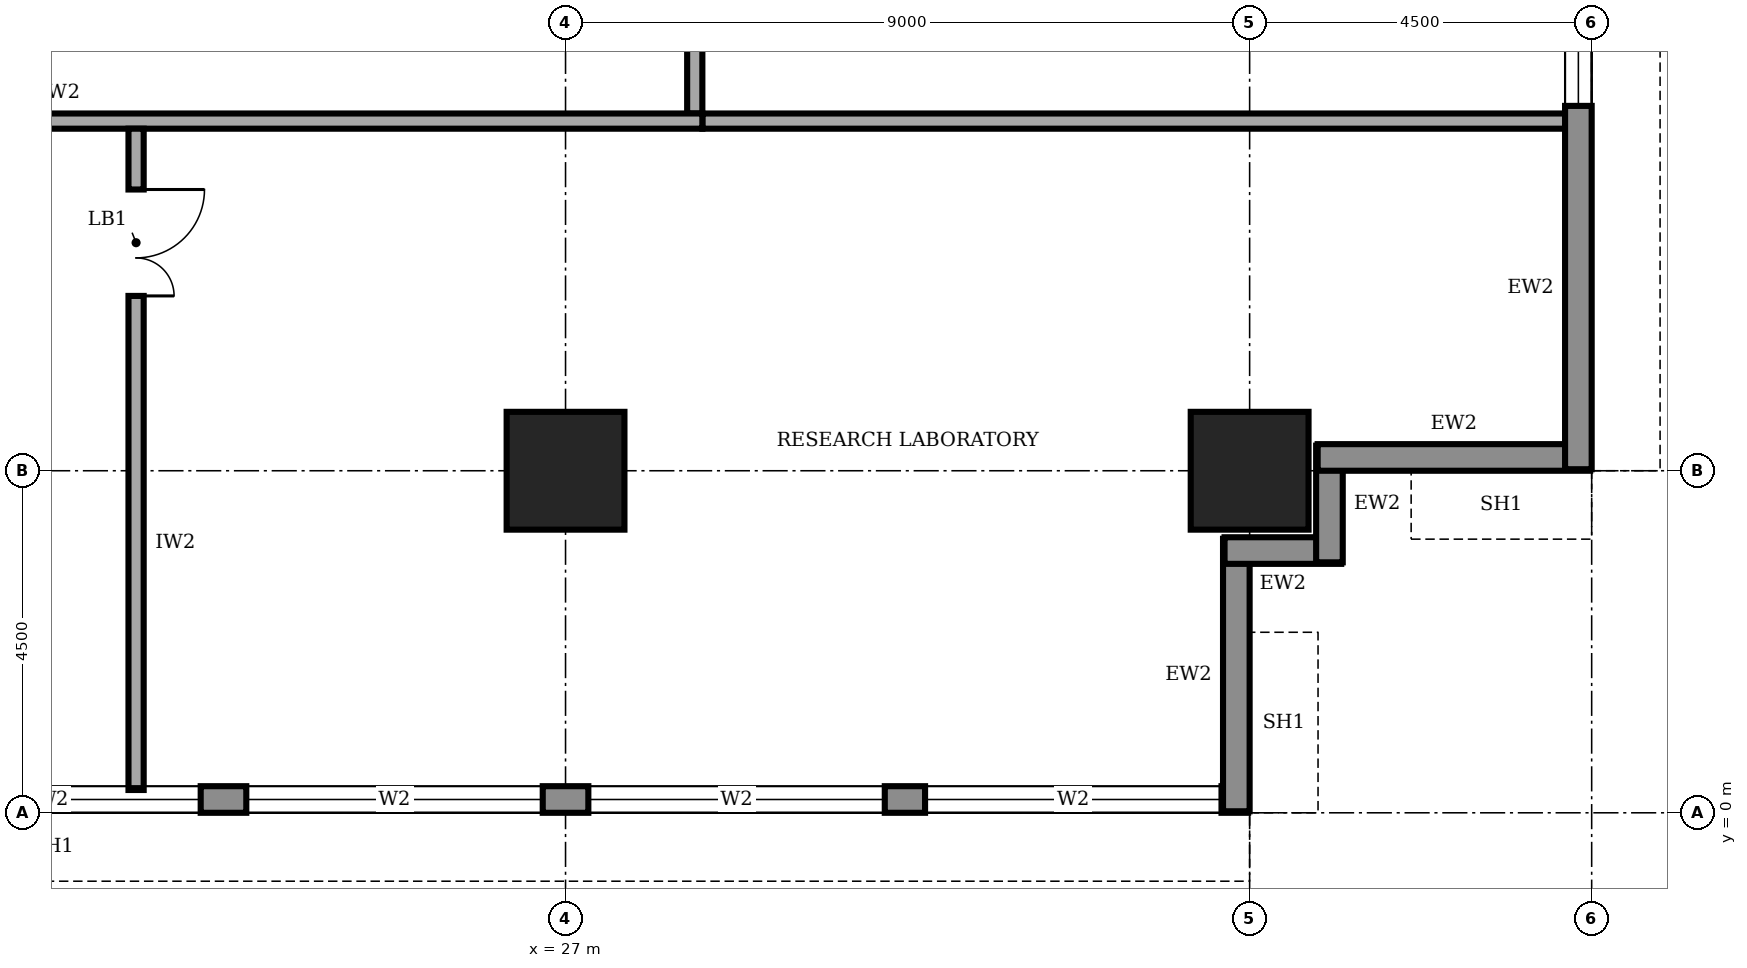
"""IFC4 building model, lengths in metres.
Left out: names, types, materials, properties, quantities, classifications, styles, units other than length and angle.
Written with IfcOpenShell. Run it as: python <this file> out.ifc"""

import sys

from ifc_helpers import new_model, si_unit, direction, frame, frame_2d, origin, origin_2d, place, context, subcontext, project, spatial, rectangle, extrude, element, fill, save


model = new_model("IFC4")
c1 = context("Model", 3, precision=1e-05, world=origin(), true_north=direction((0.0, 1.0)))
c2 = subcontext(c1, "Body", "Model", "MODEL_VIEW")
j1 = project(units=[si_unit("LENGTHUNIT", "METRE"), si_unit("PLANEANGLEUNIT", "RADIAN")], contexts=[c1])
p1 = place(None, origin())
s1 = spatial("IfcSite", under=j1, at=p1, CompositionType="ELEMENT")
p2 = place(p1, origin())
s2 = spatial("IfcBuilding", under=s1, at=p2, CompositionType="ELEMENT")
p3 = place(p2, frame((0.0, 0.0, 233.0)))
s3 = spatial("IfcBuildingStorey", under=s2, at=p3, CompositionType="ELEMENT", Elevation=233.0)
for number, where, z_axis, x_axis in (
    (1, (27.0, 4.5, 0.0), (0.0, 0.0, 1.0), (1.0, 0.0, 0.0)),
    (2, (36.0, 4.5, 0.0), (0.0, 0.0, 1.0), (1.0, 0.0, 0.0)),
):
    element("IfcColumn", number, at=place(p3, frame(where, z_axis=z_axis, x_axis=x_axis)), inside=s3, PredefinedType="COLUMN", context=c2, shape_type="SweptSolid", body=[
        extrude(rectangle(XDim=1.55, YDim=1.55, at=origin_2d()), origin(), (0.0, 0.0, 1.0), 4.0),
    ])
p4 = place(p3, frame((4.52, 0.175, 0.0), z_axis=(0.0, 0.0, 1.0), x_axis=(1.0, 0.0, 0.0)))
e3 = element("IfcWall", 3, at=p4, inside=s3, PredefinedType="STANDARD", context=c2, shape_type="SweptSolid", body=[
    extrude(rectangle(XDim=31.46, YDim=0.35, at=frame_2d((15.73, 0.0))), origin(), (0.0, 0.0, 1.0), 3.75),
])
p5 = place(p4, frame((4.78, 0.0, 0.6)))
e4 = element("IfcOpeningElement", 4, at=p5, cuts=e3, PredefinedType="OPENING", context=c2, shape_type="SweptSolid", body=[
    extrude(rectangle(XDim=3.9, YDim=2.6, at=frame_2d((1.95, 1.3))), frame((0.0, 0.185, 0.0), z_axis=(0.0, -1.0, 0.0), x_axis=(1.0, 0.0, 0.0)), (0.0, 0.0, 1.0), 0.37),
])
p6 = place(p4, frame((9.28, 0.0, 0.6)))
e5 = element("IfcOpeningElement", 5, at=p6, cuts=e3, PredefinedType="OPENING", context=c2, shape_type="SweptSolid", body=[
    extrude(rectangle(XDim=3.9, YDim=2.6, at=frame_2d((1.95, 1.3))), frame((0.0, 0.185, 0.0), z_axis=(0.0, -1.0, 0.0), x_axis=(1.0, 0.0, 0.0)), (0.0, 0.0, 1.0), 0.37),
])
p7 = place(p4, frame((13.78, 0.0, 0.6)))
e6 = element("IfcOpeningElement", 6, at=p7, cuts=e3, PredefinedType="OPENING", context=c2, shape_type="SweptSolid", body=[
    extrude(rectangle(XDim=3.9, YDim=2.6, at=frame_2d((1.95, 1.3))), frame((0.0, 0.185, 0.0), z_axis=(0.0, -1.0, 0.0), x_axis=(1.0, 0.0, 0.0)), (0.0, 0.0, 1.0), 0.37),
])
p8 = place(p4, frame((18.28, 0.0, 0.6)))
e7 = element("IfcOpeningElement", 7, at=p8, cuts=e3, PredefinedType="OPENING", context=c2, shape_type="SweptSolid", body=[
    extrude(rectangle(XDim=3.9, YDim=2.6, at=frame_2d((1.95, 1.3))), frame((0.0, 0.185, 0.0), z_axis=(0.0, -1.0, 0.0), x_axis=(1.0, 0.0, 0.0)), (0.0, 0.0, 1.0), 0.37),
])
p9 = place(p4, frame((22.78, 0.0, 0.6)))
e8 = element("IfcOpeningElement", 8, at=p9, cuts=e3, PredefinedType="OPENING", context=c2, shape_type="SweptSolid", body=[
    extrude(rectangle(XDim=3.9, YDim=2.6, at=frame_2d((1.95, 1.3))), frame((0.0, 0.185, 0.0), z_axis=(0.0, -1.0, 0.0), x_axis=(1.0, 0.0, 0.0)), (0.0, 0.0, 1.0), 0.37),
])
p10 = place(p4, frame((27.21, 0.0, 0.6)))
e9 = element("IfcOpeningElement", 9, at=p10, cuts=e3, PredefinedType="OPENING", context=c2, shape_type="SweptSolid", body=[
    extrude(rectangle(XDim=3.9, YDim=2.6, at=frame_2d((1.95, 1.3))), frame((0.0, 0.185, 0.0), z_axis=(0.0, -1.0, 0.0), x_axis=(1.0, 0.0, 0.0)), (0.0, 0.0, 1.0), 0.37),
])
p11 = place(p3, frame((35.825, 0.02, 0.0), z_axis=(0.0, 0.0, 1.0), x_axis=(0.0, 1.0, 0.0)))
e10 = element("IfcWall", 10, at=p11, inside=s3, PredefinedType="STANDARD", context=c2, shape_type="SweptSolid", body=[
    extrude(rectangle(XDim=3.585, YDim=0.35, at=frame_2d((1.792, 0.0))), origin(), (0.0, 0.0, 1.0), 2.85),
])
for number, where, z_axis, x_axis in (
    (11, (35.67, 3.45, 0.0), (0.0, 0.0, 1.0), (1.0, 0.0, 0.0)),
    (12, (37.05, 3.295, 0.0), (0.0, 0.0, 1.0), (0.0, 1.0, 0.0)),
):
    element("IfcWall", number, at=place(p3, frame(where, z_axis=z_axis, x_axis=x_axis)), inside=s3, PredefinedType="STANDARD", context=c2, shape_type="SweptSolid", body=[
        extrude(rectangle(XDim=1.535, YDim=0.35, at=frame_2d((0.768, 0.0))), origin(), (0.0, 0.0, 1.0), 3.75),
    ])
p12 = place(p3, frame((36.895, 4.675, 0.0), z_axis=(0.0, 0.0, 1.0), x_axis=(1.0, 0.0, 0.0)))
e13 = element("IfcWall", 13, at=p12, inside=s3, PredefinedType="STANDARD", context=c2, shape_type="SweptSolid", body=[
    extrude(rectangle(XDim=3.585, YDim=0.35, at=frame_2d((1.792, 0.0))), origin(), (0.0, 0.0, 1.0), 2.85),
])
p13 = place(p3, frame((40.325, 4.52, 0.0), z_axis=(0.0, 0.0, 1.0), x_axis=(0.0, 1.0, 0.0)))
e14 = element("IfcWall", 14, at=p13, inside=s3, PredefinedType="STANDARD", context=c2, shape_type="SweptSolid", body=[
    extrude(rectangle(XDim=31.46, YDim=0.35, at=frame_2d((15.73, 0.0))), origin(), (0.0, 0.0, 1.0), 3.75),
])
p14 = place(p13, frame((4.78, 0.0, 0.6)))
e15 = element("IfcOpeningElement", 15, at=p14, cuts=e14, PredefinedType="OPENING", context=c2, shape_type="SweptSolid", body=[
    extrude(rectangle(XDim=3.9, YDim=2.6, at=frame_2d((1.95, 1.3))), frame((0.0, 0.185, 0.0), z_axis=(0.0, -1.0, 0.0), x_axis=(1.0, 0.0, 0.0)), (0.0, 0.0, 1.0), 0.37),
])
p15 = place(p13, frame((9.28, 0.0, 0.6)))
e16 = element("IfcOpeningElement", 16, at=p15, cuts=e14, PredefinedType="OPENING", context=c2, shape_type="SweptSolid", body=[
    extrude(rectangle(XDim=3.9, YDim=2.6, at=frame_2d((1.95, 1.3))), frame((0.0, 0.185, 0.0), z_axis=(0.0, -1.0, 0.0), x_axis=(1.0, 0.0, 0.0)), (0.0, 0.0, 1.0), 0.37),
])
p16 = place(p13, frame((13.78, 0.0, 0.6)))
e17 = element("IfcOpeningElement", 17, at=p16, cuts=e14, PredefinedType="OPENING", context=c2, shape_type="SweptSolid", body=[
    extrude(rectangle(XDim=3.9, YDim=2.6, at=frame_2d((1.95, 1.3))), frame((0.0, 0.185, 0.0), z_axis=(0.0, -1.0, 0.0), x_axis=(1.0, 0.0, 0.0)), (0.0, 0.0, 1.0), 0.37),
])
p17 = place(p13, frame((18.28, 0.0, 0.6)))
e18 = element("IfcOpeningElement", 18, at=p17, cuts=e14, PredefinedType="OPENING", context=c2, shape_type="SweptSolid", body=[
    extrude(rectangle(XDim=3.9, YDim=2.6, at=frame_2d((1.95, 1.3))), frame((0.0, 0.185, 0.0), z_axis=(0.0, -1.0, 0.0), x_axis=(1.0, 0.0, 0.0)), (0.0, 0.0, 1.0), 0.37),
])
p18 = place(p13, frame((22.78, 0.0, 0.6)))
e19 = element("IfcOpeningElement", 19, at=p18, cuts=e14, PredefinedType="OPENING", context=c2, shape_type="SweptSolid", body=[
    extrude(rectangle(XDim=3.9, YDim=2.6, at=frame_2d((1.95, 1.3))), frame((0.0, 0.185, 0.0), z_axis=(0.0, -1.0, 0.0), x_axis=(1.0, 0.0, 0.0)), (0.0, 0.0, 1.0), 0.37),
])
p19 = place(p13, frame((27.21, 0.0, 0.6)))
e20 = element("IfcOpeningElement", 20, at=p19, cuts=e14, PredefinedType="OPENING", context=c2, shape_type="SweptSolid", body=[
    extrude(rectangle(XDim=3.9, YDim=2.6, at=frame_2d((1.95, 1.3))), frame((0.0, 0.185, 0.0), z_axis=(0.0, -1.0, 0.0), x_axis=(1.0, 0.0, 0.0)), (0.0, 0.0, 1.0), 0.37),
])
p20 = place(p3, frame((11.9, 9.1, 0.0), z_axis=(0.0, 0.0, 1.0), x_axis=(1.0, 0.0, 0.0)))
e21 = element("IfcWall", 21, at=p20, inside=s3, PredefinedType="SOLIDWALL", context=c2, shape_type="SweptSolid", body=[
    extrude(rectangle(XDim=16.9, YDim=0.2, at=frame_2d((8.45, 0.0))), origin(), (0.0, 0.0, 1.0), 3.75),
])
p21 = place(p3, frame((28.7, 9.2, 0.0), z_axis=(0.0, 0.0, 1.0), x_axis=(0.0, 1.0, 0.0)))
e22 = element("IfcWall", 22, at=p21, inside=s3, PredefinedType="SOLIDWALL", context=c2, shape_type="SweptSolid", body=[
    extrude(rectangle(XDim=23.05, YDim=0.2, at=frame_2d((11.525, 0.0))), origin(), (0.0, 0.0, 1.0), 3.75),
])
p22 = place(p21, frame((3.4, 0.0, 0.0)))
e23 = element("IfcOpeningElement", 23, at=p22, cuts=e22, PredefinedType="OPENING", context=c2, shape_type="SweptSolid", body=[
    extrude(rectangle(XDim=1.8, YDim=2.1, at=frame_2d((0.9, 1.05))), frame((0.0, 0.11, 0.0), z_axis=(0.0, -1.0, 0.0), x_axis=(1.0, 0.0, 0.0)), (0.0, 0.0, 1.0), 0.22),
])
p23 = place(p21, frame((12.4, 0.0, 0.0)))
e24 = element("IfcOpeningElement", 24, at=p23, cuts=e22, PredefinedType="OPENING", context=c2, shape_type="SweptSolid", body=[
    extrude(rectangle(XDim=1.8, YDim=2.1, at=frame_2d((0.9, 1.05))), frame((0.0, 0.11, 0.0), z_axis=(0.0, -1.0, 0.0), x_axis=(1.0, 0.0, 0.0)), (0.0, 0.0, 1.0), 0.22),
])
p24 = place(p21, frame((19.925, 0.0, 0.0)))
e25 = element("IfcOpeningElement", 25, at=p24, cuts=e22, PredefinedType="OPENING", context=c2, shape_type="SweptSolid", body=[
    extrude(rectangle(XDim=1.0, YDim=2.1, at=frame_2d((0.5, 1.05))), frame((0.0, 0.11, 0.0), z_axis=(0.0, -1.0, 0.0), x_axis=(1.0, 0.0, 0.0)), (0.0, 0.0, 1.0), 0.22),
])
p25 = place(p3, frame((21.35, 9.0, 0.0), z_axis=(0.0, 0.0, 1.0), x_axis=(0.0, -1.0, 0.0)))
e26 = element("IfcWall", 26, at=p25, inside=s3, PredefinedType="SOLIDWALL", context=c2, shape_type="SweptSolid", body=[
    extrude(rectangle(XDim=8.7, YDim=0.2, at=frame_2d((4.35, 0.0))), origin(), (0.0, 0.0, 1.0), 3.75),
])
p26 = place(p25, frame((0.8, 0.0, 0.0)))
e27 = element("IfcOpeningElement", 27, at=p26, cuts=e26, PredefinedType="OPENING", context=c2, shape_type="SweptSolid", body=[
    extrude(rectangle(XDim=1.4, YDim=2.1, at=frame_2d((0.7, 1.05))), frame((0.0, 0.11, 0.0), z_axis=(0.0, -1.0, 0.0), x_axis=(1.0, 0.0, 0.0)), (0.0, 0.0, 1.0), 0.22),
])
p27 = place(p3, frame((28.8, 9.1, 0.0), z_axis=(0.0, 0.0, 1.0), x_axis=(1.0, 0.0, 0.0)))
e28 = element("IfcWall", 28, at=p27, inside=s3, PredefinedType="SOLIDWALL", context=c2, shape_type="SweptSolid", body=[
    extrude(rectangle(XDim=11.4, YDim=0.2, at=frame_2d((5.7, 0.0))), origin(), (0.0, 0.0, 1.0), 3.75),
])
p28 = place(p7, origin())
e29 = element("IfcWindow", 29, at=p28, inside=s3, PartitioningType="SINGLE_PANEL", PredefinedType="WINDOW", context=c2, shape_type="SweptSolid", body=[
    extrude(rectangle(XDim=3.9, YDim=2.6, at=frame_2d((1.95, 1.3))), frame((0.0, 0.03, 0.0), z_axis=(0.0, -1.0, 0.0), x_axis=(1.0, 0.0, 0.0)), (0.0, 0.0, 1.0), 0.06),
])
fill(e6, e29)
p29 = place(p8, origin())
e30 = element("IfcWindow", 30, at=p29, inside=s3, PartitioningType="SINGLE_PANEL", PredefinedType="WINDOW", context=c2, shape_type="SweptSolid", body=[
    extrude(rectangle(XDim=3.9, YDim=2.6, at=frame_2d((1.95, 1.3))), frame((0.0, 0.03, 0.0), z_axis=(0.0, -1.0, 0.0), x_axis=(1.0, 0.0, 0.0)), (0.0, 0.0, 1.0), 0.06),
])
fill(e7, e30)
p30 = place(p9, origin())
e31 = element("IfcWindow", 31, at=p30, inside=s3, PartitioningType="SINGLE_PANEL", PredefinedType="WINDOW", context=c2, shape_type="SweptSolid", body=[
    extrude(rectangle(XDim=3.9, YDim=2.6, at=frame_2d((1.95, 1.3))), frame((0.0, 0.03, 0.0), z_axis=(0.0, -1.0, 0.0), x_axis=(1.0, 0.0, 0.0)), (0.0, 0.0, 1.0), 0.06),
])
fill(e8, e31)
p31 = place(p10, origin())
e32 = element("IfcWindow", 32, at=p31, inside=s3, PartitioningType="SINGLE_PANEL", PredefinedType="WINDOW", context=c2, shape_type="SweptSolid", body=[
    extrude(rectangle(XDim=3.9, YDim=2.6, at=frame_2d((1.95, 1.3))), frame((0.0, 0.03, 0.0), z_axis=(0.0, -1.0, 0.0), x_axis=(1.0, 0.0, 0.0)), (0.0, 0.0, 1.0), 0.06),
])
fill(e9, e32)
p32 = place(p14, origin())
e33 = element("IfcWindow", 33, at=p32, inside=s3, PartitioningType="SINGLE_PANEL", PredefinedType="WINDOW", context=c2, shape_type="SweptSolid", body=[
    extrude(rectangle(XDim=3.9, YDim=2.6, at=frame_2d((1.95, 1.3))), frame((0.0, 0.03, 0.0), z_axis=(0.0, -1.0, 0.0), x_axis=(1.0, 0.0, 0.0)), (0.0, 0.0, 1.0), 0.06),
])
fill(e15, e33)
p33 = place(p26, origin())
e34 = element("IfcDoor", 34, at=p33, inside=s3, OperationType="DOUBLE_DOOR_SINGLE_SWING", PredefinedType="DOOR", context=c2, shape_type="SweptSolid", body=[
    extrude(rectangle(XDim=1.4, YDim=2.1, at=frame_2d((0.7, 1.05))), frame((0.0, 0.025, 0.0), z_axis=(0.0, -1.0, 0.0), x_axis=(1.0, 0.0, 0.0)), (0.0, 0.0, 1.0), 0.05),
])
fill(e27, e34)
save(model, sys.argv[1])
